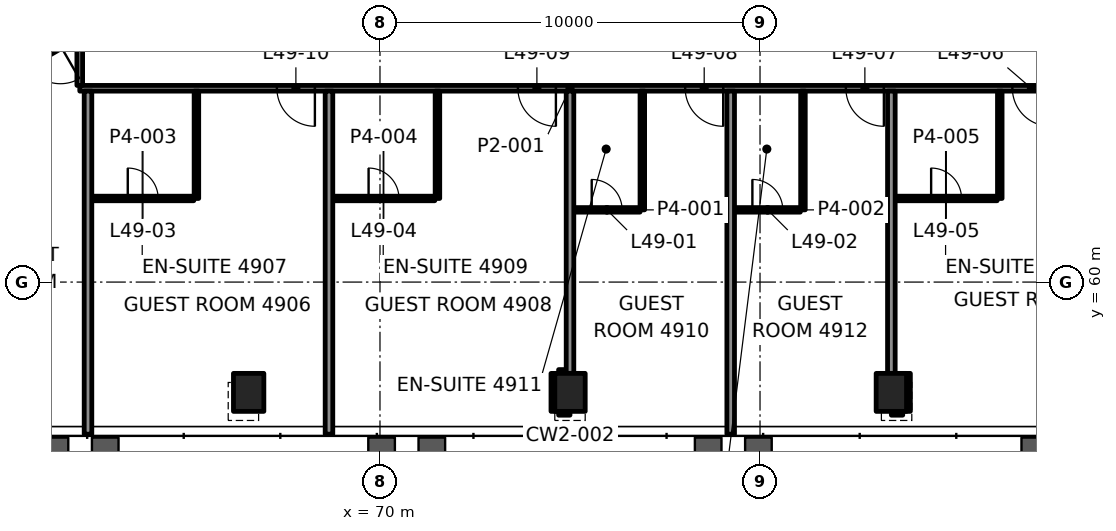
"""IFC4 building model, lengths in metres.
Left out: names, types, materials, properties, quantities, classifications, styles, units other than length and angle.
Written with IfcOpenShell. Run it as: python <this file> out.ifc"""

import sys

from ifc_helpers import new_model, si_unit, direction, frame, frame_2d, origin, origin_2d, place, context, subcontext, project, spatial, rectangle, hollow_rectangle, extrude, element, fill, save


model = new_model("IFC4")
c1 = context("Model", 3, precision=1e-05, world=origin(), true_north=direction((0.0, 1.0)))
c2 = subcontext(c1, "Body", "Model", "MODEL_VIEW")
j1 = project(units=[si_unit("LENGTHUNIT", "METRE"), si_unit("PLANEANGLEUNIT", "RADIAN")], contexts=[c1])
p1 = place(None, origin())
s1 = spatial("IfcSite", under=j1, at=p1, CompositionType="ELEMENT")
p2 = place(p1, origin())
s2 = spatial("IfcBuilding", under=s1, at=p2, CompositionType="ELEMENT")
p3 = place(p2, frame((0.0, 0.0, 210.4)))
s3 = spatial("IfcBuildingStorey", under=s2, at=p3, CompositionType="ELEMENT", Elevation=210.4)
for number, where, z_axis, x_axis in (
    (1, (66.544, 57.097, -0.0), (0.0, 0.0, 1.0), (1.0, 0.0, 0.0)),
    (2, (75.0, 57.097, -0.0), (0.0, 0.0, 1.0), (1.0, 0.0, 0.0)),
    (3, (83.456, 57.097, -0.0), (0.0, 0.0, 1.0), (1.0, 0.0, 0.0)),
):
    element("IfcColumn", number, at=place(p3, frame(where, z_axis=z_axis, x_axis=x_axis)), inside=s3, PredefinedType="COLUMN", context=c2, shape_type="SweptSolid", body=[
        extrude(hollow_rectangle(XDim=0.8, YDim=1.0, WallThickness=0.05, at=origin_2d()), origin(), (0.0, 0.0, 1.0), 3.9),
    ])
p4 = place(p3, frame((74.7, 56.597, 0.0), z_axis=(0.0, 0.0, 1.0), x_axis=(1.0, 0.0, 0.0)))
e4 = element("IfcWall", 4, at=p4, inside=s3, PredefinedType="PARTITIONING", context=c2, shape_type="SweptSolid", body=[
    extrude(rectangle(XDim=0.299, YDim=0.2, at=frame_2d((0.149, 0.0))), origin(), (0.0, 0.0, 1.0), 3.1),
])
p5 = place(p3, frame((83.456, 56.597, 0.0), z_axis=(0.0, 0.0, 1.0), x_axis=(1.0, 0.0, 0.0)))
e5 = element("IfcWall", 5, at=p5, inside=s3, PredefinedType="PARTITIONING", context=c2, shape_type="SweptSolid", body=[
    extrude(rectangle(XDim=0.3, YDim=0.2, at=frame_2d((0.15, 0.0))), origin(), (0.0, 0.0, 1.0), 3.1),
])
p6 = place(p3, frame((74.7, 57.597, 0.0), z_axis=(0.0, 0.0, 1.0), x_axis=(1.0, 0.0, 0.0)))
e6 = element("IfcWall", 6, at=p6, inside=s3, PredefinedType="PARTITIONING", context=c2, shape_type="SweptSolid", body=[
    extrude(rectangle(XDim=0.199, YDim=0.2, at=frame_2d((0.1, 0.0))), origin(), (0.0, 0.0, 1.0), 3.1),
])
p7 = place(p3, frame((75.1, 61.9, 0.0), z_axis=(0.0, 0.0, 1.0), x_axis=(1.0, 0.0, 0.0)))
e7 = element("IfcWall", 7, at=p7, inside=s3, PredefinedType="PARTITIONING", context=c2, shape_type="SweptSolid", body=[
    extrude(rectangle(XDim=1.742, YDim=0.12, at=frame_2d((0.871, 0.0))), origin(), (0.0, 0.0, 1.0), 3.1),
])
p8 = place(p7, frame((0.471, 0.0, 0.0)))
e8 = element("IfcOpeningElement", 8, at=p8, cuts=e7, PredefinedType="OPENING", context=c2, shape_type="SweptSolid", body=[
    extrude(rectangle(XDim=0.8, YDim=2.1, at=frame_2d((0.4, 1.05))), frame((0.0, 0.07, 0.0), z_axis=(0.0, -1.0, 0.0), x_axis=(1.0, 0.0, 0.0)), (0.0, 0.0, 1.0), 0.14),
])
p9 = place(p3, frame((79.338, 61.9, 0.0), z_axis=(0.0, 0.0, 1.0), x_axis=(1.0, 0.0, 0.0)))
e9 = element("IfcWall", 9, at=p9, inside=s3, PredefinedType="PARTITIONING", context=c2, shape_type="SweptSolid", body=[
    extrude(rectangle(XDim=1.722, YDim=0.12, at=frame_2d((0.861, 0.0))), origin(), (0.0, 0.0, 1.0), 3.1),
])
p10 = place(p9, frame((0.461, 0.0, 0.0)))
e10 = element("IfcOpeningElement", 10, at=p10, cuts=e9, PredefinedType="OPENING", context=c2, shape_type="SweptSolid", body=[
    extrude(rectangle(XDim=0.8, YDim=2.1, at=frame_2d((0.4, 1.05))), frame((0.0, 0.07, 0.0), z_axis=(0.0, -1.0, 0.0), x_axis=(1.0, 0.0, 0.0)), (0.0, 0.0, 1.0), 0.14),
])
p11 = place(p3, frame((62.427, 62.2, 0.0), z_axis=(0.0, 0.0, 1.0), x_axis=(1.0, 0.0, 0.0)))
e11 = element("IfcWall", 11, at=p11, inside=s3, PredefinedType="PARTITIONING", context=c2, shape_type="SweptSolid", body=[
    extrude(rectangle(XDim=2.674, YDim=0.12, at=frame_2d((1.337, 0.0))), origin(), (0.0, 0.0, 1.0), 3.1),
])
p12 = place(p11, frame((0.937, 0.0, 0.0)))
e12 = element("IfcOpeningElement", 12, at=p12, cuts=e11, PredefinedType="OPENING", context=c2, shape_type="SweptSolid", body=[
    extrude(rectangle(XDim=0.8, YDim=2.1, at=frame_2d((0.4, 1.05))), frame((0.0, 0.07, 0.0), z_axis=(0.0, -1.0, 0.0), x_axis=(1.0, 0.0, 0.0)), (0.0, 0.0, 1.0), 0.14),
])
p13 = place(p3, frame((68.758, 62.2, 0.0), z_axis=(0.0, 0.0, 1.0), x_axis=(1.0, 0.0, 0.0)))
e13 = element("IfcWall", 13, at=p13, inside=s3, PredefinedType="PARTITIONING", context=c2, shape_type="SweptSolid", body=[
    extrude(rectangle(XDim=2.684, YDim=0.12, at=frame_2d((1.342, 0.0))), origin(), (0.0, 0.0, 1.0), 3.1),
])
p14 = place(p13, frame((0.942, 0.0, 0.0)))
e14 = element("IfcOpeningElement", 14, at=p14, cuts=e13, PredefinedType="OPENING", context=c2, shape_type="SweptSolid", body=[
    extrude(rectangle(XDim=0.8, YDim=2.1, at=frame_2d((0.4, 1.05))), frame((0.0, 0.07, 0.0), z_axis=(0.0, -1.0, 0.0), x_axis=(1.0, 0.0, 0.0)), (0.0, 0.0, 1.0), 0.14),
])
p15 = place(p3, frame((83.566, 62.2, 0.0), z_axis=(0.0, 0.0, 1.0), x_axis=(1.0, 0.0, 0.0)))
e15 = element("IfcWall", 15, at=p15, inside=s3, PredefinedType="PARTITIONING", context=c2, shape_type="SweptSolid", body=[
    extrude(rectangle(XDim=2.674, YDim=0.12, at=frame_2d((1.337, 0.0))), origin(), (0.0, 0.0, 1.0), 3.1),
])
p16 = place(p15, frame((0.937, 0.0, 0.0)))
e16 = element("IfcOpeningElement", 16, at=p16, cuts=e15, PredefinedType="OPENING", context=c2, shape_type="SweptSolid", body=[
    extrude(rectangle(XDim=0.8, YDim=2.1, at=frame_2d((0.4, 1.05))), frame((0.0, 0.07, 0.0), z_axis=(0.0, -1.0, 0.0), x_axis=(1.0, 0.0, 0.0)), (0.0, 0.0, 1.0), 0.14),
])
p17 = place(p3, frame((87.899, 65.1, 0.0), z_axis=(0.0, 0.0, 1.0), x_axis=(-1.0, 0.0, 0.0)))
e17 = element("IfcWall", 17, at=p17, inside=s3, PredefinedType="PARTITIONING", context=c2, shape_type="SweptSolid", body=[
    extrude(rectangle(XDim=25.799, YDim=0.15, at=frame_2d((12.899, 0.0))), origin(), (0.0, 0.0, 1.0), 3.1),
])
p18 = place(p17, frame((0.259, 0.0, 0.0)))
e18 = element("IfcOpeningElement", 18, at=p18, cuts=e17, PredefinedType="OPENING", context=c2, shape_type="SweptSolid", body=[
    extrude(rectangle(XDim=1.0, YDim=2.1, at=frame_2d((0.5, 1.05))), frame((0.0, 0.085, 0.0), z_axis=(0.0, -1.0, 0.0), x_axis=(1.0, 0.0, 0.0)), (0.0, 0.0, 1.0), 0.17),
])
p19 = place(p17, frame((4.641, 0.0, 0.0)))
e19 = element("IfcOpeningElement", 19, at=p19, cuts=e17, PredefinedType="OPENING", context=c2, shape_type="SweptSolid", body=[
    extrude(rectangle(XDim=1.0, YDim=2.1, at=frame_2d((0.5, 1.05))), frame((0.0, 0.085, 0.0), z_axis=(0.0, -1.0, 0.0), x_axis=(1.0, 0.0, 0.0)), (0.0, 0.0, 1.0), 0.17),
])
p20 = place(p17, frame((8.868, 0.0, 0.0)))
e20 = element("IfcOpeningElement", 20, at=p20, cuts=e17, PredefinedType="OPENING", context=c2, shape_type="SweptSolid", body=[
    extrude(rectangle(XDim=1.0, YDim=2.1, at=frame_2d((0.5, 1.05))), frame((0.0, 0.085, 0.0), z_axis=(0.0, -1.0, 0.0), x_axis=(1.0, 0.0, 0.0)), (0.0, 0.0, 1.0), 0.17),
])
p21 = place(p17, frame((13.271, 0.0, 0.0)))
e21 = element("IfcOpeningElement", 21, at=p21, cuts=e17, PredefinedType="OPENING", context=c2, shape_type="SweptSolid", body=[
    extrude(rectangle(XDim=1.0, YDim=2.1, at=frame_2d((0.5, 1.05))), frame((0.0, 0.085, 0.0), z_axis=(0.0, -1.0, 0.0), x_axis=(1.0, 0.0, 0.0)), (0.0, 0.0, 1.0), 0.17),
])
p22 = place(p17, frame((19.612, 0.0, 0.0)))
e22 = element("IfcOpeningElement", 22, at=p22, cuts=e17, PredefinedType="OPENING", context=c2, shape_type="SweptSolid", body=[
    extrude(rectangle(XDim=1.0, YDim=2.1, at=frame_2d((0.5, 1.05))), frame((0.0, 0.085, 0.0), z_axis=(0.0, -1.0, 0.0), x_axis=(1.0, 0.0, 0.0)), (0.0, 0.0, 1.0), 0.17),
])
p23 = place(p3, frame((62.1, 66.513, 0.0), z_axis=(0.0, 0.0, 1.0), x_axis=(-0.866025886419, -0.499999164051, 0.0)))
e23 = element("IfcWall", 23, at=p23, inside=s3, PredefinedType="PARTITIONING", context=c2, shape_type="SweptSolid", body=[
    extrude(rectangle(XDim=12.754, YDim=0.15, at=frame_2d((6.377, 0.0))), origin(), (0.0, 0.0, 1.0), 2.947),
])
p24 = place(p23, frame((0.587, 0.0, 0.0)))
e24 = element("IfcOpeningElement", 24, at=p24, cuts=e23, PredefinedType="OPENING", context=c2, shape_type="SweptSolid", body=[
    extrude(rectangle(XDim=1.0, YDim=2.1, at=frame_2d((0.5, 1.05))), frame((0.0, 0.085, 0.0), z_axis=(0.0, -1.0, 0.0), x_axis=(1.0, 0.0, 0.0)), (0.0, 0.0, 1.0), 0.17),
])
p25 = place(p23, frame((7.742, 0.0, 0.0)))
e25 = element("IfcOpeningElement", 25, at=p25, cuts=e23, PredefinedType="OPENING", context=c2, shape_type="SweptSolid", body=[
    extrude(rectangle(XDim=1.0, YDim=2.1, at=frame_2d((0.5, 1.05))), frame((0.0, 0.085, 0.0), z_axis=(0.0, -1.0, 0.0), x_axis=(1.0, 0.0, 0.0)), (0.0, 0.0, 1.0), 0.17),
])
p26 = place(p3, frame((50.155, 61.695, 0.0), z_axis=(0.0, 0.0, 1.0), x_axis=(0.8660236305, 0.500003071406, 0.0)))
e26 = element("IfcWall", 26, at=p26, inside=s3, PredefinedType="PARTITIONING", context=c2, shape_type="SweptSolid", body=[
    extrude(rectangle(XDim=13.707, YDim=0.15, at=frame_2d((6.853, 0.0))), origin(), (0.0, 0.0, 1.0), 3.1),
])
p27 = place(p26, frame((1.736, 0.0, 0.0)))
e27 = element("IfcOpeningElement", 27, at=p27, cuts=e26, PredefinedType="OPENING", context=c2, shape_type="SweptSolid", body=[
    extrude(rectangle(XDim=1.0, YDim=2.1, at=frame_2d((0.5, 1.05))), frame((0.0, 0.085, 0.0), z_axis=(0.0, -1.0, 0.0), x_axis=(1.0, 0.0, 0.0)), (0.0, 0.0, 1.0), 0.17),
])
p28 = place(p26, frame((11.777, 0.0, 0.0)))
e28 = element("IfcOpeningElement", 28, at=p28, cuts=e26, PredefinedType="OPENING", context=c2, shape_type="SweptSolid", body=[
    extrude(rectangle(XDim=1.0, YDim=2.1, at=frame_2d((0.5, 1.05))), frame((0.0, 0.085, 0.0), z_axis=(0.0, -1.0, 0.0), x_axis=(1.0, 0.0, 0.0)), (0.0, 0.0, 1.0), 0.17),
])
p29 = place(p3, frame((86.309, 62.2, 0.0), z_axis=(0.0, 0.0, 1.0), x_axis=(0.0, 1.0, 0.0)))
e29 = element("IfcWall", 29, at=p29, inside=s3, PredefinedType="PARTITIONING", context=c2, shape_type="SweptSolid", body=[
    extrude(rectangle(XDim=2.825, YDim=0.12, at=frame_2d((1.413, 0.0))), origin(), (0.0, 0.0, 1.0), 3.1),
])
p30 = place(p3, frame((83.856, 56.598, 0.0), z_axis=(0.0, 0.0, 1.0), x_axis=(0.0, 1.0, 0.0)))
e30 = element("IfcWall", 30, at=p30, inside=s3, PredefinedType="PARTITIONING", context=c2, shape_type="SweptSolid", body=[
    extrude(rectangle(XDim=0.999, YDim=0.2, at=frame_2d((0.5, 0.0))), origin(), (0.0, 0.0, 1.0), 3.022),
])
p31 = place(p3, frame((83.456, 57.597, 0.0), z_axis=(0.0, 0.0, 1.0), x_axis=(0.0, 1.0, 0.0)))
e31 = element("IfcWall", 31, at=p31, inside=s3, PredefinedType="PARTITIONING", context=c2, shape_type="SweptSolid", body=[
    extrude(rectangle(XDim=7.427, YDim=0.2, at=frame_2d((3.714, 0.0))), origin(), (0.0, 0.0, 1.0), 3.1),
])
p32 = place(p3, frame((81.13, 61.9, 0.0), z_axis=(0.0, 0.0, 1.0), x_axis=(0.0, 1.0, 0.0)))
e32 = element("IfcWall", 32, at=p32, inside=s3, PredefinedType="PARTITIONING", context=c2, shape_type="SweptSolid", body=[
    extrude(rectangle(XDim=3.125, YDim=0.12, at=frame_2d((1.562, 0.0))), origin(), (0.0, 0.0, 1.0), 3.1),
])
p33 = place(p3, frame((79.228, 55.998, 0.0), z_axis=(0.0, 0.0, 1.0), x_axis=(0.0, 1.0, 0.0)))
e33 = element("IfcWall", 33, at=p33, inside=s3, PredefinedType="PARTITIONING", context=c2, shape_type="SweptSolid", body=[
    extrude(rectangle(XDim=9.027, YDim=0.2, at=frame_2d((4.514, 0.0))), origin(), (0.0, 0.0, 1.0), 3.022),
])
p34 = place(p3, frame((76.903, 61.9, 0.0), z_axis=(0.0, 0.0, 1.0), x_axis=(0.0, 1.0, 0.0)))
e34 = element("IfcWall", 34, at=p34, inside=s3, PredefinedType="PARTITIONING", context=c2, shape_type="SweptSolid", body=[
    extrude(rectangle(XDim=3.125, YDim=0.12, at=frame_2d((1.562, 0.0))), origin(), (0.0, 0.0, 1.0), 3.1),
])
p35 = place(p3, frame((75.0, 57.598, 0.0), z_axis=(0.0, 0.0, 1.0), x_axis=(0.0, 1.0, 0.0)))
e35 = element("IfcWall", 35, at=p35, inside=s3, PredefinedType="PARTITIONING", context=c2, shape_type="SweptSolid", body=[
    extrude(rectangle(XDim=7.427, YDim=0.2, at=frame_2d((3.713, 0.0))), origin(), (0.0, 0.0, 1.0), 3.1),
])
p36 = place(p3, frame((74.6, 56.598, 0.0), z_axis=(0.0, 0.0, 1.0), x_axis=(0.0, 1.0, 0.0)))
e36 = element("IfcWall", 36, at=p36, inside=s3, PredefinedType="PARTITIONING", context=c2, shape_type="SweptSolid", body=[
    extrude(rectangle(XDim=0.999, YDim=0.2, at=frame_2d((0.5, 0.0))), origin(), (0.0, 0.0, 1.0), 3.022),
])
p37 = place(p3, frame((71.512, 62.2, 0.0), z_axis=(0.0, 0.0, 1.0), x_axis=(0.0, 1.0, 0.0)))
e37 = element("IfcWall", 37, at=p37, inside=s3, PredefinedType="PARTITIONING", context=c2, shape_type="SweptSolid", body=[
    extrude(rectangle(XDim=2.825, YDim=0.12, at=frame_2d((1.413, 0.0))), origin(), (0.0, 0.0, 1.0), 3.1),
])
p38 = place(p3, frame((68.658, 55.998, 0.0), z_axis=(0.0, 0.0, 1.0), x_axis=(0.0, 1.0, 0.0)))
e38 = element("IfcWall", 38, at=p38, inside=s3, PredefinedType="PARTITIONING", context=c2, shape_type="SweptSolid", body=[
    extrude(rectangle(XDim=9.027, YDim=0.2, at=frame_2d((4.514, 0.0))), origin(), (0.0, 0.0, 1.0), 3.022),
])
p39 = place(p3, frame((65.17, 62.2, 0.0), z_axis=(0.0, 0.0, 1.0), x_axis=(0.0, 1.0, 0.0)))
e39 = element("IfcWall", 39, at=p39, inside=s3, PredefinedType="PARTITIONING", context=c2, shape_type="SweptSolid", body=[
    extrude(rectangle(XDim=2.825, YDim=0.12, at=frame_2d((1.413, 0.0))), origin(), (0.0, 0.0, 1.0), 3.1),
])
p40 = place(p3, frame((62.317, 55.998, 0.0), z_axis=(0.0, 0.0, 1.0), x_axis=(0.0, 1.0, 0.0)))
e40 = element("IfcWall", 40, at=p40, inside=s3, PredefinedType="PARTITIONING", context=c2, shape_type="SweptSolid", body=[
    extrude(rectangle(XDim=9.027, YDim=0.2, at=frame_2d((4.514, 0.0))), origin(), (0.0, 0.0, 1.0), 3.022),
])
p41 = place(p3, frame((62.1, 65.176, 0.0), z_axis=(0.0, 0.0, 1.0), x_axis=(0.0, 1.0, 0.0)))
e41 = element("IfcWall", 41, at=p41, inside=s3, PredefinedType="PARTITIONING", context=c2, shape_type="SweptSolid", body=[
    extrude(rectangle(XDim=1.201, YDim=0.15, at=frame_2d((0.6, 0.0))), origin(), (0.0, 0.0, 1.0), 2.947),
])
p42 = place(p8, origin())
e42 = element("IfcDoor", 42, at=p42, inside=s3, OperationType="SINGLE_SWING_RIGHT", PredefinedType="DOOR", context=c2, shape_type="SweptSolid", body=[
    extrude(rectangle(XDim=0.8, YDim=2.1, at=frame_2d((0.4, 1.05))), frame((0.0, 0.025, 0.0), z_axis=(0.0, -1.0, 0.0), x_axis=(1.0, 0.0, 0.0)), (0.0, 0.0, 1.0), 0.05),
])
fill(e8, e42)
p43 = place(p10, origin())
e43 = element("IfcDoor", 43, at=p43, inside=s3, OperationType="SINGLE_SWING_RIGHT", PredefinedType="DOOR", context=c2, shape_type="SweptSolid", body=[
    extrude(rectangle(XDim=0.8, YDim=2.1, at=frame_2d((0.4, 1.05))), frame((0.0, 0.025, 0.0), z_axis=(0.0, -1.0, 0.0), x_axis=(1.0, 0.0, 0.0)), (0.0, 0.0, 1.0), 0.05),
])
fill(e10, e43)
p44 = place(p12, origin())
e44 = element("IfcDoor", 44, at=p44, inside=s3, OperationType="SINGLE_SWING_RIGHT", PredefinedType="DOOR", context=c2, shape_type="SweptSolid", body=[
    extrude(rectangle(XDim=0.8, YDim=2.1, at=frame_2d((0.4, 1.05))), frame((0.0, 0.025, 0.0), z_axis=(0.0, -1.0, 0.0), x_axis=(1.0, 0.0, 0.0)), (0.0, 0.0, 1.0), 0.05),
])
fill(e12, e44)
p45 = place(p14, origin())
e45 = element("IfcDoor", 45, at=p45, inside=s3, OperationType="SINGLE_SWING_RIGHT", PredefinedType="DOOR", context=c2, shape_type="SweptSolid", body=[
    extrude(rectangle(XDim=0.8, YDim=2.1, at=frame_2d((0.4, 1.05))), frame((0.0, 0.025, 0.0), z_axis=(0.0, -1.0, 0.0), x_axis=(1.0, 0.0, 0.0)), (0.0, 0.0, 1.0), 0.05),
])
fill(e14, e45)
p46 = place(p16, origin())
e46 = element("IfcDoor", 46, at=p46, inside=s3, OperationType="SINGLE_SWING_RIGHT", PredefinedType="DOOR", context=c2, shape_type="SweptSolid", body=[
    extrude(rectangle(XDim=0.8, YDim=2.1, at=frame_2d((0.4, 1.05))), frame((0.0, 0.025, 0.0), z_axis=(0.0, -1.0, 0.0), x_axis=(1.0, 0.0, 0.0)), (0.0, 0.0, 1.0), 0.05),
])
fill(e16, e46)
p47 = place(p18, origin())
e47 = element("IfcDoor", 47, at=p47, inside=s3, OperationType="SINGLE_SWING_RIGHT", PredefinedType="DOOR", context=c2, shape_type="SweptSolid", body=[
    extrude(rectangle(XDim=1.0, YDim=2.1, at=frame_2d((0.5, 1.05))), frame((0.0, 0.025, 0.0), z_axis=(0.0, -1.0, 0.0), x_axis=(1.0, 0.0, 0.0)), (0.0, 0.0, 1.0), 0.05),
])
fill(e18, e47)
p48 = place(p19, origin())
e48 = element("IfcDoor", 48, at=p48, inside=s3, OperationType="SINGLE_SWING_RIGHT", PredefinedType="DOOR", context=c2, shape_type="SweptSolid", body=[
    extrude(rectangle(XDim=1.0, YDim=2.1, at=frame_2d((0.5, 1.05))), frame((0.0, 0.025, 0.0), z_axis=(0.0, -1.0, 0.0), x_axis=(1.0, 0.0, 0.0)), (0.0, 0.0, 1.0), 0.05),
])
fill(e19, e48)
p49 = place(p20, origin())
e49 = element("IfcDoor", 49, at=p49, inside=s3, OperationType="SINGLE_SWING_RIGHT", PredefinedType="DOOR", context=c2, shape_type="SweptSolid", body=[
    extrude(rectangle(XDim=1.0, YDim=2.1, at=frame_2d((0.5, 1.05))), frame((0.0, 0.025, 0.0), z_axis=(0.0, -1.0, 0.0), x_axis=(1.0, 0.0, 0.0)), (0.0, 0.0, 1.0), 0.05),
])
fill(e20, e49)
p50 = place(p21, origin())
e50 = element("IfcDoor", 50, at=p50, inside=s3, OperationType="SINGLE_SWING_RIGHT", PredefinedType="DOOR", context=c2, shape_type="SweptSolid", body=[
    extrude(rectangle(XDim=1.0, YDim=2.1, at=frame_2d((0.5, 1.05))), frame((0.0, 0.025, 0.0), z_axis=(0.0, -1.0, 0.0), x_axis=(1.0, 0.0, 0.0)), (0.0, 0.0, 1.0), 0.05),
])
fill(e21, e50)
p51 = place(p22, origin())
e51 = element("IfcDoor", 51, at=p51, inside=s3, OperationType="SINGLE_SWING_RIGHT", PredefinedType="DOOR", context=c2, shape_type="SweptSolid", body=[
    extrude(rectangle(XDim=1.0, YDim=2.1, at=frame_2d((0.5, 1.05))), frame((0.0, 0.025, 0.0), z_axis=(0.0, -1.0, 0.0), x_axis=(1.0, 0.0, 0.0)), (0.0, 0.0, 1.0), 0.05),
])
fill(e22, e51)
p52 = place(p24, origin())
e52 = element("IfcDoor", 52, at=p52, inside=s3, OperationType="SINGLE_SWING_RIGHT", PredefinedType="DOOR", context=c2, shape_type="SweptSolid", body=[
    extrude(rectangle(XDim=1.0, YDim=2.1, at=frame_2d((0.5, 1.05))), frame((0.0, 0.025, 0.0), z_axis=(0.0, -1.0, 0.0), x_axis=(1.0, 0.0, 0.0)), (0.0, 0.0, 1.0), 0.05),
])
fill(e24, e52)
save(model, sys.argv[1])
